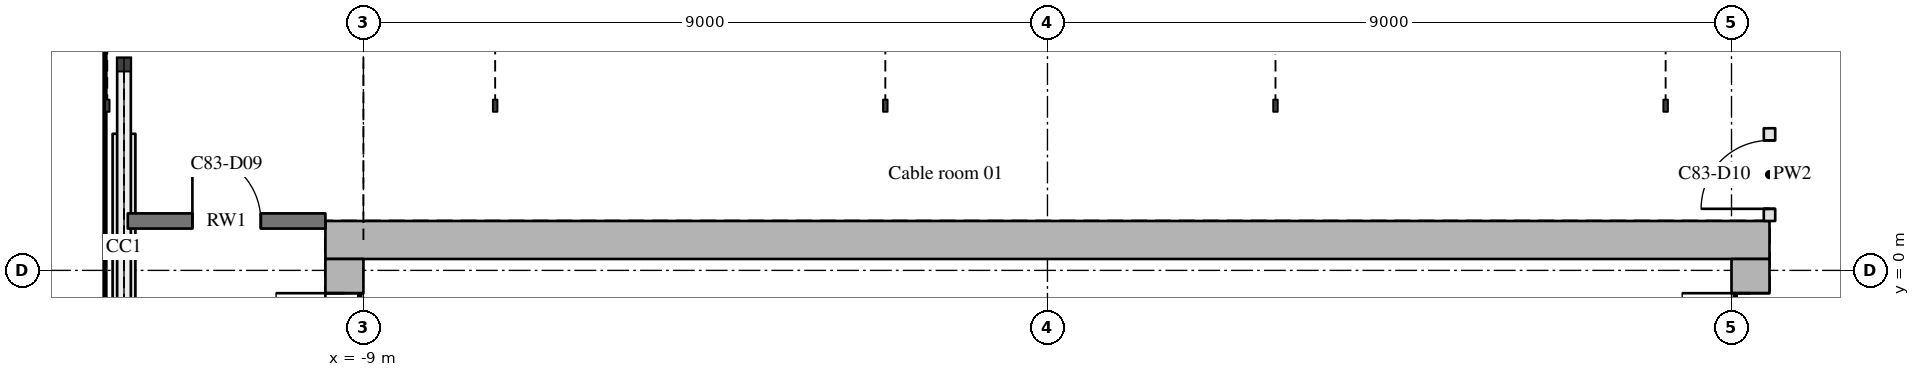
"""IFC4 building model, lengths in metres.
Left out: names, types, materials, properties, quantities, classifications, styles, units other than length and angle.
Written with IfcOpenShell. Run it as: python <this file> out.ifc"""

import sys

from ifc_helpers import new_model, si_unit, direction, frame, frame_2d, origin, place, context, subcontext, project, spatial, polyline, rectangle, outline, extrude, element, fill, save


model = new_model("IFC4")
c1 = context("Model", 3, precision=1e-05, world=origin(), true_north=direction((0.0, 1.0)))
c2 = subcontext(c1, "Body", "Model", "MODEL_VIEW")
j1 = project(units=[si_unit("LENGTHUNIT", "METRE"), si_unit("PLANEANGLEUNIT", "RADIAN")], contexts=[c1])
p1 = place(None, origin())
s1 = spatial("IfcSite", under=j1, at=p1, CompositionType="ELEMENT")
p2 = place(p1, origin())
s2 = spatial("IfcBuilding", under=s1, at=p2, CompositionType="ELEMENT")
p3 = place(p2, frame((0.0, 0.0, 308.1)))
s3 = spatial("IfcBuildingStorey", under=s2, at=p3, CompositionType="ELEMENT", Elevation=308.1)
p4 = place(p3, frame((-9.5, 0.4, 0.0), z_axis=(0.0, 0.0, 1.0), x_axis=(1.0, 0.0, 0.0)))
e1 = element("IfcWall", 1, at=p4, inside=s3, PredefinedType="SHEAR", context=c2, shape_type="SweptSolid", body=[
    extrude(outline(polyline([(0.0, 0.0), (19.0, 0.0), (19.0, 3.6), (0.0, 3.6), (0.0, 0.0)])), frame((0.0, 0.25, 0.0), z_axis=(0.0, -1.0, 0.0), x_axis=(1.0, 0.0, 0.0)), (0.0, 0.0, 1.0), 0.5),
])
p5 = place(p3, frame((-9.25, -11.5, 0.0), z_axis=(0.0, 0.0, 1.0), x_axis=(0.0, 1.0, 0.0)))
e2 = element("IfcWall", 2, at=p5, inside=s3, PredefinedType="SHEAR", context=c2, shape_type="SweptSolid", body=[
    extrude(outline(polyline([(0.0, 0.0), (11.65, 0.0), (11.65, 3.6), (0.0, 3.6), (0.0, 0.0)])), frame((0.0, 0.25, 0.0), z_axis=(0.0, -1.0, 0.0), x_axis=(1.0, 0.0, 0.0)), (0.0, 0.0, 1.0), 0.5),
])
p6 = place(p5, frame((9.4, 0.0, 0.0)))
e3 = element("IfcOpeningElement", 3, at=p6, cuts=e2, PredefinedType="OPENING", context=c2, shape_type="SweptSolid", body=[
    extrude(rectangle(XDim=1.8, YDim=2.1, at=frame_2d((0.9, 1.05))), frame((0.0, 0.26, 0.0), z_axis=(0.0, -1.0, 0.0), x_axis=(1.0, 0.0, 0.0)), (0.0, 0.0, 1.0), 0.52),
])
p7 = place(p5, frame((5.25, 0.0, 0.0)))
e4 = element("IfcOpeningElement", 4, at=p7, cuts=e2, PredefinedType="OPENING", context=c2, shape_type="SweptSolid", body=[
    extrude(rectangle(XDim=1.1, YDim=2.1, at=frame_2d((0.55, 1.05))), frame((0.0, 0.26, 0.0), z_axis=(0.0, -1.0, 0.0), x_axis=(1.0, 0.0, 0.0)), (0.0, 0.0, 1.0), 0.52),
])
p8 = place(p3, frame((9.25, -11.5, 0.0), z_axis=(0.0, 0.0, 1.0), x_axis=(0.0, 1.0, 0.0)))
e5 = element("IfcWall", 5, at=p8, inside=s3, PredefinedType="SHEAR", context=c2, shape_type="SweptSolid", body=[
    extrude(outline(polyline([(0.0, 0.0), (11.65, 0.0), (11.65, 3.6), (0.0, 3.6), (0.0, 0.0)])), frame((0.0, 0.25, 0.0), z_axis=(0.0, -1.0, 0.0), x_axis=(1.0, 0.0, 0.0)), (0.0, 0.0, 1.0), 0.5),
])
p9 = place(p8, frame((9.4, 0.0, 0.0)))
e6 = element("IfcOpeningElement", 6, at=p9, cuts=e5, PredefinedType="OPENING", context=c2, shape_type="SweptSolid", body=[
    extrude(rectangle(XDim=1.8, YDim=2.1, at=frame_2d((0.9, 1.05))), frame((0.0, 0.26, 0.0), z_axis=(0.0, -1.0, 0.0), x_axis=(1.0, 0.0, 0.0)), (0.0, 0.0, 1.0), 0.52),
])
p10 = place(p8, frame((5.25, 0.0, 0.0)))
e7 = element("IfcOpeningElement", 7, at=p10, cuts=e5, PredefinedType="OPENING", context=c2, shape_type="SweptSolid", body=[
    extrude(rectangle(XDim=1.1, YDim=2.1, at=frame_2d((0.55, 1.05))), frame((0.0, 0.26, 0.0), z_axis=(0.0, -1.0, 0.0), x_axis=(1.0, 0.0, 0.0)), (0.0, 0.0, 1.0), 0.52),
])
p11 = place(p3, frame((-12.1, 0.65, 0.0), z_axis=(0.0, 0.0, 1.0), x_axis=(1.0, 0.0, 0.0)))
e8 = element("IfcWall", 8, at=p11, inside=s3, PredefinedType="SOLIDWALL", context=c2, shape_type="SweptSolid", body=[
    extrude(rectangle(XDim=2.6, YDim=0.2, at=frame_2d((1.3, 0.0))), origin(), (0.0, 0.0, 1.0), 2.66),
])
p12 = place(p11, frame((0.85, 0.0, 0.0)))
e9 = element("IfcOpeningElement", 9, at=p12, cuts=e8, PredefinedType="OPENING", context=c2, shape_type="SweptSolid", body=[
    extrude(rectangle(XDim=0.9, YDim=2.1, at=frame_2d((0.45, 1.05))), frame((0.0, 0.11, 0.0), z_axis=(0.0, -1.0, 0.0), x_axis=(1.0, 0.0, 0.0)), (0.0, 0.0, 1.0), 0.22),
])
p13 = place(p3, frame((9.5, 0.65, 0.0), z_axis=(0.0, 0.0, 1.0), x_axis=(0.0, 1.0, 0.0)))
e10 = element("IfcWall", 10, at=p13, inside=s3, PredefinedType="PARTITIONING", context=c2, shape_type="SweptSolid", body=[
    extrude(rectangle(XDim=1.22, YDim=0.15, at=frame_2d((0.61, 0.0))), origin(), (0.0, 0.0, 1.0), 2.66),
])
p14 = place(p13, frame((0.16, 0.0, 0.0)))
e11 = element("IfcOpeningElement", 11, at=p14, cuts=e10, PredefinedType="OPENING", context=c2, shape_type="SweptSolid", body=[
    extrude(rectangle(XDim=0.9, YDim=2.1, at=frame_2d((0.45, 1.05))), frame((0.0, 0.085, 0.0), z_axis=(0.0, -1.0, 0.0), x_axis=(1.0, 0.0, 0.0)), (0.0, 0.0, 1.0), 0.17),
])
p15 = place(p9, origin())
e12 = element("IfcDoor", 12, at=p15, inside=s3, OperationType="DOUBLE_DOOR_SINGLE_SWING", PredefinedType="DOOR", context=c2, shape_type="SweptSolid", body=[
    extrude(rectangle(XDim=1.8, YDim=2.1, at=frame_2d((0.9, 1.05))), frame((0.0, 0.025, 0.0), z_axis=(0.0, -1.0, 0.0), x_axis=(1.0, 0.0, 0.0)), (0.0, 0.0, 1.0), 0.05),
])
fill(e6, e12)
p16 = place(p6, origin())
e13 = element("IfcDoor", 13, at=p16, inside=s3, OperationType="DOUBLE_DOOR_SINGLE_SWING", PredefinedType="DOOR", context=c2, shape_type="SweptSolid", body=[
    extrude(rectangle(XDim=1.8, YDim=2.1, at=frame_2d((0.9, 1.05))), frame((0.0, 0.025, 0.0), z_axis=(0.0, -1.0, 0.0), x_axis=(1.0, 0.0, 0.0)), (0.0, 0.0, 1.0), 0.05),
])
fill(e3, e13)
p17 = place(p14, origin())
e14 = element("IfcDoor", 14, at=p17, inside=s3, OperationType="SINGLE_SWING_LEFT", PredefinedType="DOOR", context=c2, shape_type="SweptSolid", body=[
    extrude(rectangle(XDim=0.9, YDim=2.1, at=frame_2d((0.45, 1.05))), frame((0.0, 0.025, 0.0), z_axis=(0.0, -1.0, 0.0), x_axis=(1.0, 0.0, 0.0)), (0.0, 0.0, 1.0), 0.05),
])
fill(e11, e14)
p18 = place(p12, origin())
e15 = element("IfcDoor", 15, at=p18, inside=s3, OperationType="SINGLE_SWING_LEFT", PredefinedType="DOOR", context=c2, shape_type="SweptSolid", body=[
    extrude(rectangle(XDim=0.9, YDim=2.1, at=frame_2d((0.45, 1.05))), frame((0.0, 0.025, 0.0), z_axis=(0.0, -1.0, 0.0), x_axis=(1.0, 0.0, 0.0)), (0.0, 0.0, 1.0), 0.05),
])
fill(e9, e15)
save(model, sys.argv[1])
